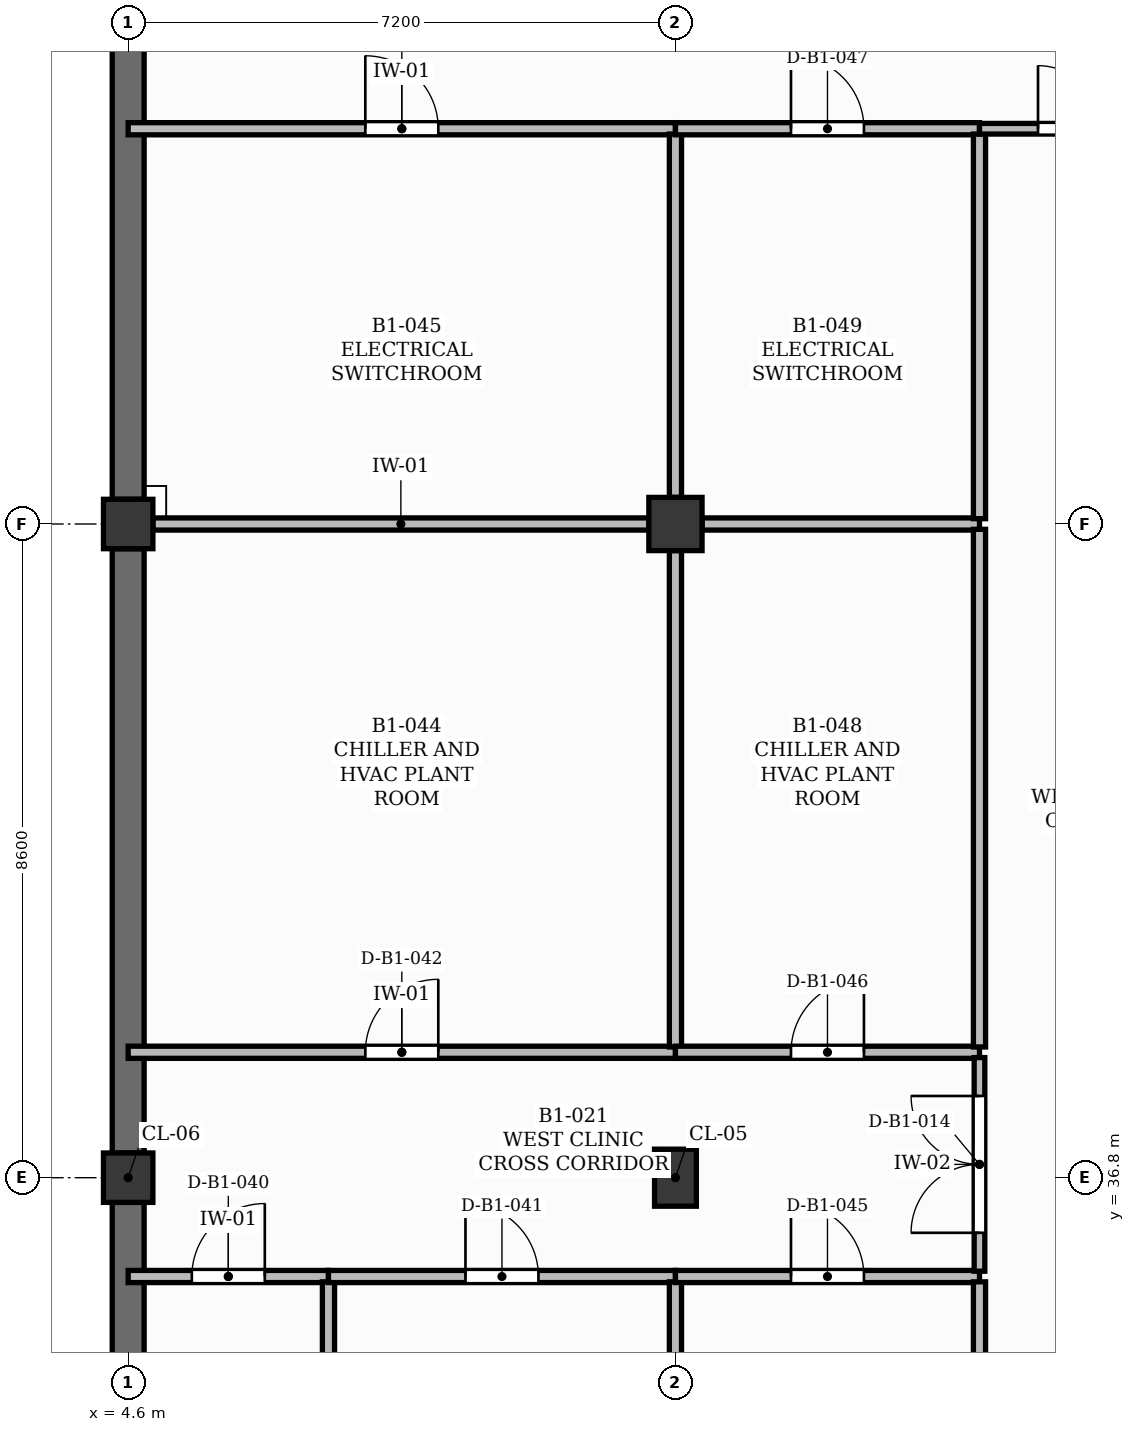
"""IFC4 building model, lengths in metres.
Left out: names, types, materials, properties, quantities, classifications, styles, units other than length and angle.
Written with IfcOpenShell. Run it as: python <this file> out.ifc"""

import sys

from ifc_helpers import new_model, si_unit, direction, frame, frame_2d, origin, origin_2d, place, context, subcontext, project, spatial, rectangle, extrude, element, fill, save


model = new_model("IFC4")
c1 = context("Model", 3, precision=1e-05, world=origin(), true_north=direction((0.0, 1.0)))
c2 = subcontext(c1, "Body", "Model", "MODEL_VIEW")
j1 = project(units=[si_unit("LENGTHUNIT", "METRE"), si_unit("PLANEANGLEUNIT", "RADIAN")], contexts=[c1])
p1 = place(None, origin())
s1 = spatial("IfcSite", under=j1, at=p1, CompositionType="ELEMENT")
p2 = place(p1, origin())
s2 = spatial("IfcBuilding", under=s1, at=p2, CompositionType="ELEMENT")
p3 = place(p2, frame((0.0, 0.0, -4.5)))
s3 = spatial("IfcBuildingStorey", under=s2, at=p3, CompositionType="ELEMENT", Elevation=-4.5)
for number, where, z_axis, x_axis in (
    (1, (4.6, 36.8, 0.0), (0.0, 0.0, 1.0), (1.0, 0.0, 0.0)),
    (2, (4.6, 45.4, 0.0), (0.0, 0.0, 1.0), (1.0, 0.0, 0.0)),
):
    element("IfcColumn", number, at=place(p3, frame(where, z_axis=z_axis, x_axis=x_axis)), inside=s3, PredefinedType="COLUMN", context=c2, shape_type="SweptSolid", body=[
        extrude(rectangle(XDim=0.65, YDim=0.65, at=origin_2d()), origin(), (0.0, 0.0, 1.0), 4.2),
    ])
p4 = place(p3, frame((11.8, 36.8, 0.0), z_axis=(0.0, 0.0, 1.0), x_axis=(1.0, 0.0, 0.0)))
e3 = element("IfcColumn", 3, at=p4, inside=s3, PredefinedType="COLUMN", context=c2, shape_type="SweptSolid", body=[
    extrude(rectangle(XDim=0.55, YDim=0.75, at=origin_2d()), origin(), (0.0, 0.0, 1.0), 4.2),
])
p5 = place(p3, frame((11.8, 45.4, 0.0), z_axis=(0.0, 0.0, 1.0), x_axis=(1.0, 0.0, 0.0)))
e4 = element("IfcColumn", 4, at=p5, inside=s3, PredefinedType="COLUMN", context=c2, shape_type="SweptSolid", body=[
    extrude(rectangle(XDim=0.7, YDim=0.7, at=origin_2d()), origin(), (0.0, 0.0, 1.0), 4.2),
])
p6 = place(p3, frame((4.6, 27.55, 0.0), z_axis=(0.0, 0.0, 1.0), x_axis=(0.0, 1.0, 0.0)))
e5 = element("IfcWall", 5, at=p6, inside=s3, PredefinedType="USERDEFINED", context=c2, shape_type="SweptSolid", body=[
    extrude(rectangle(XDim=8.925, YDim=0.42, at=frame_2d((4.462, 0.0))), origin(), (0.0, 0.0, 1.0), 4.2),
])
p7 = place(p3, frame((4.6, 37.125, 0.0), z_axis=(0.0, 0.0, 1.0), x_axis=(0.0, 1.0, 0.0)))
e6 = element("IfcWall", 6, at=p7, inside=s3, PredefinedType="USERDEFINED", context=c2, shape_type="SweptSolid", body=[
    extrude(rectangle(XDim=7.95, YDim=0.42, at=frame_2d((3.975, 0.0))), origin(), (0.0, 0.0, 1.0), 4.2),
])
p8 = place(p3, frame((4.6, 45.725, 0.0), z_axis=(0.0, 0.0, 1.0), x_axis=(0.0, 1.0, 0.0)))
e7 = element("IfcWall", 7, at=p8, inside=s3, PredefinedType="USERDEFINED", context=c2, shape_type="SweptSolid", body=[
    extrude(rectangle(XDim=6.525, YDim=0.42, at=frame_2d((3.262, 0.0))), origin(), (0.0, 0.0, 1.0), 4.2),
])
p9 = place(p3, frame((4.6, 35.5, 0.0), z_axis=(0.0, 0.0, 1.0), x_axis=(1.0, 0.0, 0.0)))
e8 = element("IfcWall", 8, at=p9, inside=s3, PredefinedType="PARTITIONING", context=c2, shape_type="SweptSolid", body=[
    extrude(rectangle(XDim=2.635, YDim=0.16, at=frame_2d((1.317, 0.0))), origin(), (0.0, 0.0, 1.0), 4.08),
])
p10 = place(p9, frame((0.837, 0.0, 0.0)))
e9 = element("IfcOpeningElement", 9, at=p10, cuts=e8, PredefinedType="OPENING", context=c2, shape_type="SweptSolid", body=[
    extrude(rectangle(XDim=0.96, YDim=2.1, at=frame_2d((0.48, 1.05))), frame((0.0, 0.09, 0.0), z_axis=(0.0, -1.0, 0.0), x_axis=(1.0, 0.0, 0.0)), (0.0, 0.0, 1.0), 0.18),
])
p11 = place(p3, frame((4.6, 38.45, 0.0), z_axis=(0.0, 0.0, 1.0), x_axis=(1.0, 0.0, 0.0)))
e10 = element("IfcWall", 10, at=p11, inside=s3, PredefinedType="PARTITIONING", context=c2, shape_type="SweptSolid", body=[
    extrude(rectangle(XDim=7.2, YDim=0.16, at=frame_2d((3.6, 0.0))), origin(), (0.0, 0.0, 1.0), 4.08),
])
p12 = place(p11, frame((3.12, 0.0, 0.0)))
e11 = element("IfcOpeningElement", 11, at=p12, cuts=e10, PredefinedType="OPENING", context=c2, shape_type="SweptSolid", body=[
    extrude(rectangle(XDim=0.96, YDim=2.1, at=frame_2d((0.48, 1.05))), frame((0.0, 0.09, 0.0), z_axis=(0.0, -1.0, 0.0), x_axis=(1.0, 0.0, 0.0)), (0.0, 0.0, 1.0), 0.18),
])
p13 = place(p3, frame((4.925, 45.4, 0.0), z_axis=(0.0, 0.0, 1.0), x_axis=(1.0, 0.0, 0.0)))
e12 = element("IfcWall", 12, at=p13, inside=s3, PredefinedType="PARTITIONING", context=c2, shape_type="SweptSolid", body=[
    extrude(rectangle(XDim=6.525, YDim=0.16, at=frame_2d((3.262, 0.0))), origin(), (0.0, 0.0, 1.0), 3.6),
])
p14 = place(p3, frame((4.6, 50.6, 0.0), z_axis=(0.0, 0.0, 1.0), x_axis=(1.0, 0.0, 0.0)))
e13 = element("IfcWall", 13, at=p14, inside=s3, PredefinedType="PARTITIONING", context=c2, shape_type="SweptSolid", body=[
    extrude(rectangle(XDim=7.2, YDim=0.16, at=frame_2d((3.6, 0.0))), origin(), (0.0, 0.0, 1.0), 4.08),
])
p15 = place(p14, frame((3.12, 0.0, 0.0)))
e14 = element("IfcOpeningElement", 14, at=p15, cuts=e13, PredefinedType="OPENING", context=c2, shape_type="SweptSolid", body=[
    extrude(rectangle(XDim=0.96, YDim=2.1, at=frame_2d((0.48, 1.05))), frame((0.0, 0.09, 0.0), z_axis=(0.0, -1.0, 0.0), x_axis=(1.0, 0.0, 0.0)), (0.0, 0.0, 1.0), 0.18),
])
p16 = place(p3, frame((7.235, 27.2, 0.0), z_axis=(0.0, 0.0, 1.0), x_axis=(0.0, 1.0, 0.0)))
e15 = element("IfcWall", 15, at=p16, inside=s3, PredefinedType="PARTITIONING", context=c2, shape_type="SweptSolid", body=[
    extrude(rectangle(XDim=8.23, YDim=0.16, at=frame_2d((4.115, 0.0))), origin(), (0.0, 0.0, 1.0), 4.08),
])
p17 = place(p3, frame((7.235, 35.5, 0.0), z_axis=(0.0, 0.0, 1.0), x_axis=(1.0, 0.0, 0.0)))
e16 = element("IfcWall", 16, at=p17, inside=s3, PredefinedType="PARTITIONING", context=c2, shape_type="SweptSolid", body=[
    extrude(rectangle(XDim=4.565, YDim=0.16, at=frame_2d((2.282, 0.0))), origin(), (0.0, 0.0, 1.0), 4.08),
])
p18 = place(p17, frame((1.802, 0.0, 0.0)))
e17 = element("IfcOpeningElement", 17, at=p18, cuts=e16, PredefinedType="OPENING", context=c2, shape_type="SweptSolid", body=[
    extrude(rectangle(XDim=0.96, YDim=2.1, at=frame_2d((0.48, 1.05))), frame((0.0, 0.09, 0.0), z_axis=(0.0, -1.0, 0.0), x_axis=(1.0, 0.0, 0.0)), (0.0, 0.0, 1.0), 0.18),
])
p19 = place(p3, frame((11.8, 27.575, 0.0), z_axis=(0.0, 0.0, 1.0), x_axis=(0.0, 1.0, 0.0)))
e18 = element("IfcWall", 18, at=p19, inside=s3, PredefinedType="PARTITIONING", context=c2, shape_type="SweptSolid", body=[
    extrude(rectangle(XDim=7.855, YDim=0.16, at=frame_2d((3.927, 0.0))), origin(), (0.0, 0.0, 1.0), 3.4),
])
p20 = place(p3, frame((11.8, 35.5, 0.0), z_axis=(0.0, 0.0, 1.0), x_axis=(1.0, 0.0, 0.0)))
e19 = element("IfcWall", 19, at=p20, inside=s3, PredefinedType="PARTITIONING", context=c2, shape_type="SweptSolid", body=[
    extrude(rectangle(XDim=4.0, YDim=0.16, at=frame_2d((2.0, 0.0))), origin(), (0.0, 0.0, 1.0), 4.08),
])
p21 = place(p20, frame((1.52, 0.0, 0.0)))
e20 = element("IfcOpeningElement", 20, at=p21, cuts=e19, PredefinedType="OPENING", context=c2, shape_type="SweptSolid", body=[
    extrude(rectangle(XDim=0.96, YDim=2.1, at=frame_2d((0.48, 1.05))), frame((0.0, 0.09, 0.0), z_axis=(0.0, -1.0, 0.0), x_axis=(1.0, 0.0, 0.0)), (0.0, 0.0, 1.0), 0.18),
])
p22 = place(p3, frame((11.8, 38.52, 0.0), z_axis=(0.0, 0.0, 1.0), x_axis=(0.0, 1.0, 0.0)))
e21 = element("IfcWall", 21, at=p22, inside=s3, PredefinedType="PARTITIONING", context=c2, shape_type="SweptSolid", body=[
    extrude(rectangle(XDim=6.53, YDim=0.16, at=frame_2d((3.265, 0.0))), origin(), (0.0, 0.0, 1.0), 3.5),
])
p23 = place(p3, frame((11.8, 38.45, 0.0), z_axis=(0.0, 0.0, 1.0), x_axis=(1.0, 0.0, 0.0)))
e22 = element("IfcWall", 22, at=p23, inside=s3, PredefinedType="PARTITIONING", context=c2, shape_type="SweptSolid", body=[
    extrude(rectangle(XDim=4.0, YDim=0.16, at=frame_2d((2.0, 0.0))), origin(), (0.0, 0.0, 1.0), 4.08),
])
p24 = place(p23, frame((1.52, 0.0, 0.0)))
e23 = element("IfcOpeningElement", 23, at=p24, cuts=e22, PredefinedType="OPENING", context=c2, shape_type="SweptSolid", body=[
    extrude(rectangle(XDim=0.96, YDim=2.1, at=frame_2d((0.48, 1.05))), frame((0.0, 0.09, 0.0), z_axis=(0.0, -1.0, 0.0), x_axis=(1.0, 0.0, 0.0)), (0.0, 0.0, 1.0), 0.18),
])
p25 = place(p3, frame((11.8, 45.75, 0.0), z_axis=(0.0, 0.0, 1.0), x_axis=(0.0, 1.0, 0.0)))
e24 = element("IfcWall", 24, at=p25, inside=s3, PredefinedType="PARTITIONING", context=c2, shape_type="SweptSolid", body=[
    extrude(rectangle(XDim=4.78, YDim=0.16, at=frame_2d((2.39, 0.0))), origin(), (0.0, 0.0, 1.0), 3.5),
])
p26 = place(p3, frame((12.15, 45.4, 0.0), z_axis=(0.0, 0.0, 1.0), x_axis=(1.0, 0.0, 0.0)))
e25 = element("IfcWall", 25, at=p26, inside=s3, PredefinedType="PARTITIONING", context=c2, shape_type="SweptSolid", body=[
    extrude(rectangle(XDim=3.65, YDim=0.16, at=frame_2d((1.825, 0.0))), origin(), (0.0, 0.0, 1.0), 3.6),
])
p27 = place(p3, frame((11.8, 50.6, 0.0), z_axis=(0.0, 0.0, 1.0), x_axis=(1.0, 0.0, 0.0)))
e26 = element("IfcWall", 26, at=p27, inside=s3, PredefinedType="PARTITIONING", context=c2, shape_type="SweptSolid", body=[
    extrude(rectangle(XDim=4.0, YDim=0.16, at=frame_2d((2.0, 0.0))), origin(), (0.0, 0.0, 1.0), 4.08),
])
p28 = place(p27, frame((1.52, 0.0, 0.0)))
e27 = element("IfcOpeningElement", 27, at=p28, cuts=e26, PredefinedType="OPENING", context=c2, shape_type="SweptSolid", body=[
    extrude(rectangle(XDim=0.96, YDim=2.1, at=frame_2d((0.48, 1.05))), frame((0.0, 0.09, 0.0), z_axis=(0.0, -1.0, 0.0), x_axis=(1.0, 0.0, 0.0)), (0.0, 0.0, 1.0), 0.18),
])
p29 = place(p3, frame((15.8, 27.27, 0.0), z_axis=(0.0, 0.0, 1.0), x_axis=(0.0, 1.0, 0.0)))
e28 = element("IfcWall", 28, at=p29, inside=s3, PredefinedType="PARTITIONING", context=c2, shape_type="SweptSolid", body=[
    extrude(rectangle(XDim=8.16, YDim=0.16, at=frame_2d((4.08, 0.0))), origin(), (0.0, 0.0, 1.0), 4.08),
])
p30 = place(p3, frame((15.8, 35.57, 0.0), z_axis=(0.0, 0.0, 1.0), x_axis=(0.0, 1.0, 0.0)))
e29 = element("IfcWall", 29, at=p30, inside=s3, PredefinedType="PARTITIONING", context=c2, shape_type="SweptSolid", body=[
    extrude(rectangle(XDim=2.81, YDim=0.14, at=frame_2d((1.405, 0.0))), origin(), (0.0, 0.0, 1.0), 4.08),
])
p31 = place(p30, frame((0.505, 0.0, 0.0)))
e30 = element("IfcOpeningElement", 30, at=p31, cuts=e29, PredefinedType="OPENING", context=c2, shape_type="SweptSolid", body=[
    extrude(rectangle(XDim=1.8, YDim=2.3, at=frame_2d((0.9, 1.15))), frame((0.0, 0.08, 0.0), z_axis=(0.0, -1.0, 0.0), x_axis=(1.0, 0.0, 0.0)), (0.0, 0.0, 1.0), 0.16),
])
p32 = place(p3, frame((15.8, 38.52, 0.0), z_axis=(0.0, 0.0, 1.0), x_axis=(0.0, 1.0, 0.0)))
e31 = element("IfcWall", 31, at=p32, inside=s3, PredefinedType="PARTITIONING", context=c2, shape_type="SweptSolid", body=[
    extrude(rectangle(XDim=6.81, YDim=0.16, at=frame_2d((3.405, 0.0))), origin(), (0.0, 0.0, 1.0), 4.08),
])
p33 = place(p3, frame((15.8, 45.47, 0.0), z_axis=(0.0, 0.0, 1.0), x_axis=(0.0, 1.0, 0.0)))
e32 = element("IfcWall", 32, at=p33, inside=s3, PredefinedType="PARTITIONING", context=c2, shape_type="SweptSolid", body=[
    extrude(rectangle(XDim=5.06, YDim=0.16, at=frame_2d((2.53, 0.0))), origin(), (0.0, 0.0, 1.0), 4.08),
])
p34 = place(p3, frame((15.8, 50.6, 0.0), z_axis=(0.0, 0.0, 1.0), x_axis=(1.0, 0.0, 0.0)))
e33 = element("IfcWall", 33, at=p34, inside=s3, PredefinedType="PARTITIONING", context=c2, shape_type="SweptSolid", body=[
    extrude(rectangle(XDim=3.2, YDim=0.14, at=frame_2d((1.6, 0.0))), origin(), (0.0, 0.0, 1.0), 4.08),
])
p35 = place(p34, frame((0.77, 0.0, 0.0)))
e34 = element("IfcOpeningElement", 34, at=p35, cuts=e33, PredefinedType="OPENING", context=c2, shape_type="SweptSolid", body=[
    extrude(rectangle(XDim=1.66, YDim=2.3, at=frame_2d((0.83, 1.15))), frame((0.0, 0.08, 0.0), z_axis=(0.0, -1.0, 0.0), x_axis=(1.0, 0.0, 0.0)), (0.0, 0.0, 1.0), 0.16),
])
p36 = place(p35, origin())
e35 = element("IfcDoor", 35, at=p36, inside=s3, OperationType="DOUBLE_DOOR_SINGLE_SWING", PredefinedType="DOOR", context=c2, shape_type="SweptSolid", body=[
    extrude(rectangle(XDim=1.66, YDim=2.3, at=frame_2d((0.83, 1.15))), frame((0.0, 0.025, 0.0), z_axis=(0.0, -1.0, 0.0), x_axis=(1.0, 0.0, 0.0)), (0.0, 0.0, 1.0), 0.05),
])
fill(e34, e35)
p37 = place(p31, origin())
e36 = element("IfcDoor", 36, at=p37, inside=s3, OperationType="DOUBLE_DOOR_SINGLE_SWING", PredefinedType="DOOR", context=c2, shape_type="SweptSolid", body=[
    extrude(rectangle(XDim=1.8, YDim=2.3, at=frame_2d((0.9, 1.15))), frame((0.0, 0.025, 0.0), z_axis=(0.0, -1.0, 0.0), x_axis=(1.0, 0.0, 0.0)), (0.0, 0.0, 1.0), 0.05),
])
fill(e30, e36)
p38 = place(p10, origin())
e37 = element("IfcDoor", 37, at=p38, inside=s3, OperationType="SINGLE_SWING_RIGHT", PredefinedType="DOOR", context=c2, shape_type="SweptSolid", body=[
    extrude(rectangle(XDim=0.96, YDim=2.1, at=frame_2d((0.48, 1.05))), frame((0.0, 0.025, 0.0), z_axis=(0.0, -1.0, 0.0), x_axis=(1.0, 0.0, 0.0)), (0.0, 0.0, 1.0), 0.05),
])
fill(e9, e37)
p39 = place(p18, origin())
e38 = element("IfcDoor", 38, at=p39, inside=s3, OperationType="SINGLE_SWING_LEFT", PredefinedType="DOOR", context=c2, shape_type="SweptSolid", body=[
    extrude(rectangle(XDim=0.96, YDim=2.1, at=frame_2d((0.48, 1.05))), frame((0.0, 0.025, 0.0), z_axis=(0.0, -1.0, 0.0), x_axis=(1.0, 0.0, 0.0)), (0.0, 0.0, 1.0), 0.05),
])
fill(e17, e38)
p40 = place(p12, origin())
e39 = element("IfcDoor", 39, at=p40, inside=s3, OperationType="SINGLE_SWING_RIGHT", PredefinedType="DOOR", context=c2, shape_type="SweptSolid", body=[
    extrude(rectangle(XDim=0.96, YDim=2.1, at=frame_2d((0.48, 1.05))), frame((0.0, 0.025, 0.0), z_axis=(0.0, -1.0, 0.0), x_axis=(1.0, 0.0, 0.0)), (0.0, 0.0, 1.0), 0.05),
])
fill(e11, e39)
p41 = place(p15, origin())
e40 = element("IfcDoor", 40, at=p41, inside=s3, OperationType="SINGLE_SWING_LEFT", PredefinedType="DOOR", context=c2, shape_type="SweptSolid", body=[
    extrude(rectangle(XDim=0.96, YDim=2.1, at=frame_2d((0.48, 1.05))), frame((0.0, 0.025, 0.0), z_axis=(0.0, -1.0, 0.0), x_axis=(1.0, 0.0, 0.0)), (0.0, 0.0, 1.0), 0.05),
])
fill(e14, e40)
p42 = place(p21, origin())
e41 = element("IfcDoor", 41, at=p42, inside=s3, OperationType="SINGLE_SWING_LEFT", PredefinedType="DOOR", context=c2, shape_type="SweptSolid", body=[
    extrude(rectangle(XDim=0.96, YDim=2.1, at=frame_2d((0.48, 1.05))), frame((0.0, 0.025, 0.0), z_axis=(0.0, -1.0, 0.0), x_axis=(1.0, 0.0, 0.0)), (0.0, 0.0, 1.0), 0.05),
])
fill(e20, e41)
p43 = place(p24, origin())
e42 = element("IfcDoor", 42, at=p43, inside=s3, OperationType="SINGLE_SWING_RIGHT", PredefinedType="DOOR", context=c2, shape_type="SweptSolid", body=[
    extrude(rectangle(XDim=0.96, YDim=2.1, at=frame_2d((0.48, 1.05))), frame((0.0, 0.025, 0.0), z_axis=(0.0, -1.0, 0.0), x_axis=(1.0, 0.0, 0.0)), (0.0, 0.0, 1.0), 0.05),
])
fill(e23, e42)
p44 = place(p28, origin())
e43 = element("IfcDoor", 43, at=p44, inside=s3, OperationType="SINGLE_SWING_LEFT", PredefinedType="DOOR", context=c2, shape_type="SweptSolid", body=[
    extrude(rectangle(XDim=0.96, YDim=2.1, at=frame_2d((0.48, 1.05))), frame((0.0, 0.025, 0.0), z_axis=(0.0, -1.0, 0.0), x_axis=(1.0, 0.0, 0.0)), (0.0, 0.0, 1.0), 0.05),
])
fill(e27, e43)
save(model, sys.argv[1])
